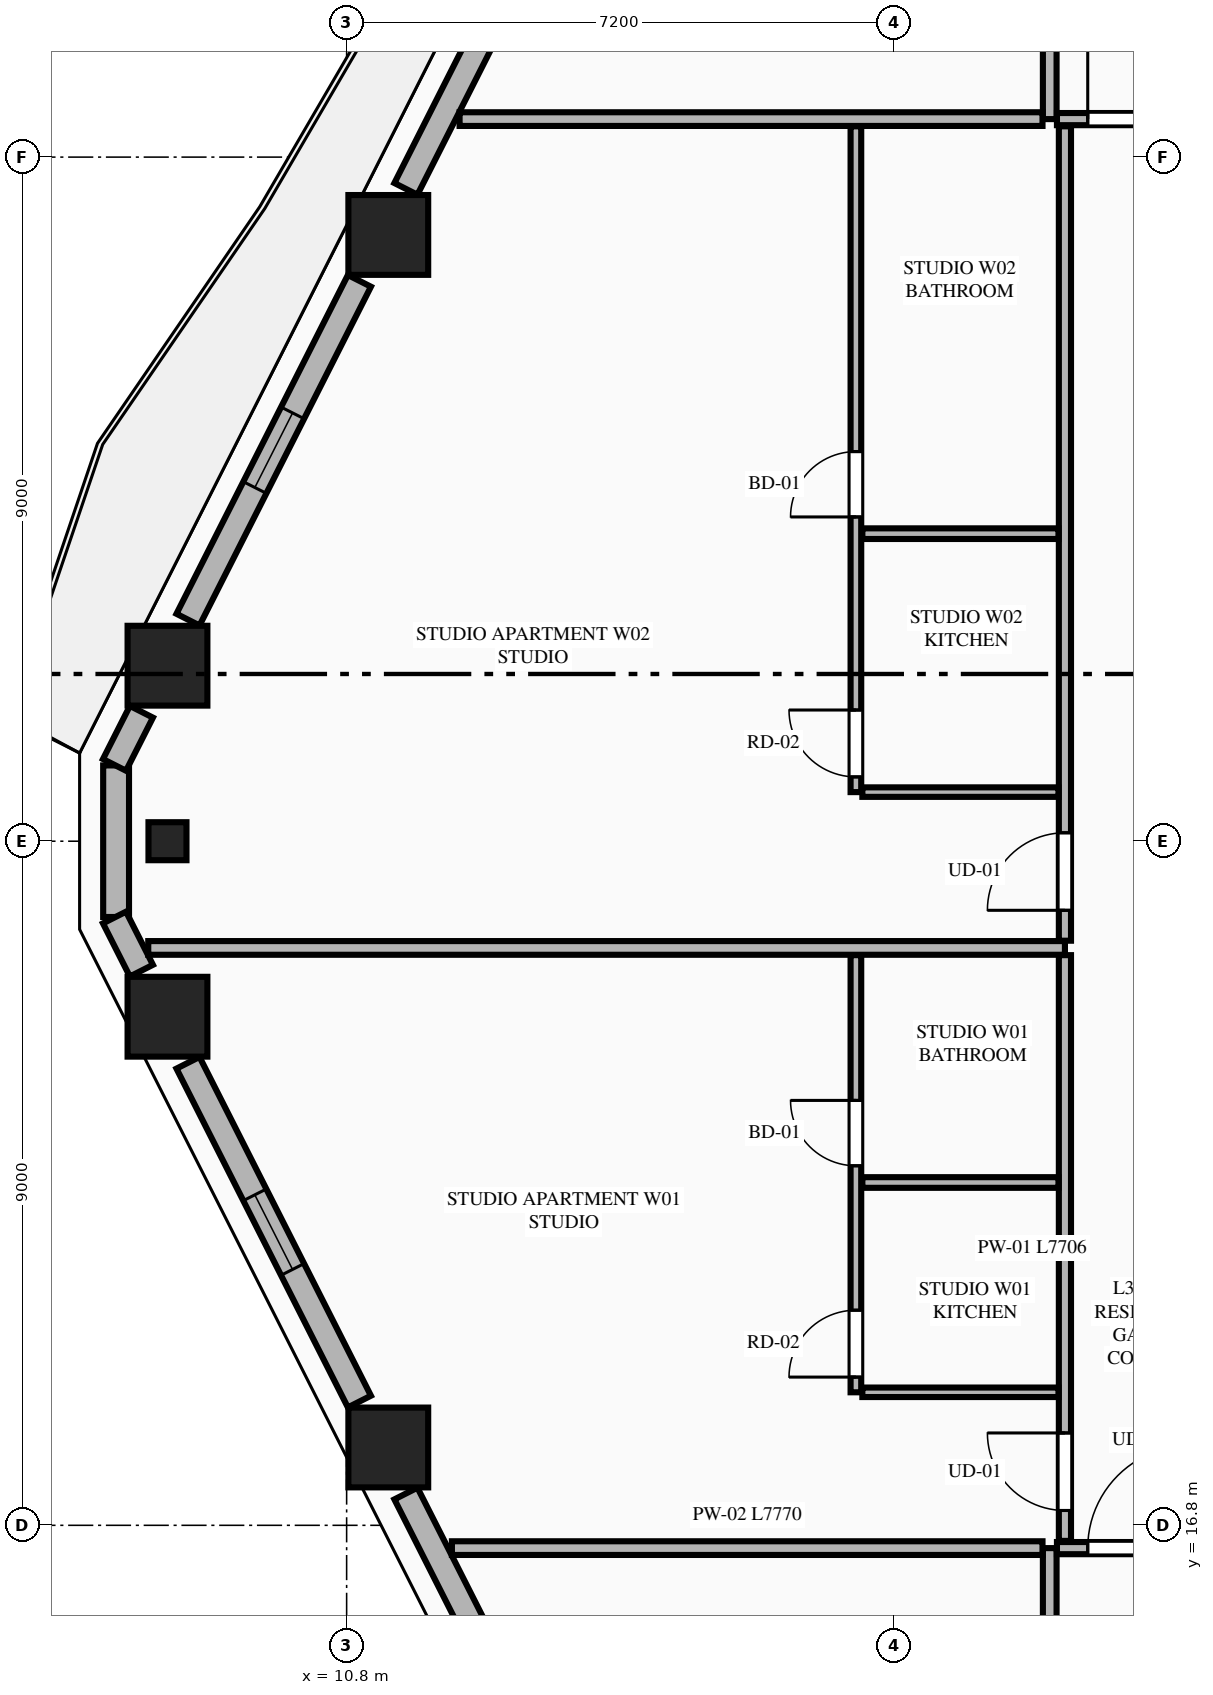
"""IFC4 building model, lengths in metres.
Left out: names, types, materials, properties, quantities, classifications, styles, units other than length and angle.
Written with IfcOpenShell. Run it as: python <this file> out.ifc"""

import sys

from ifc_helpers import new_model, si_unit, direction, frame, frame_2d, origin, origin_2d, place, context, subcontext, project, spatial, rectangle, extrude, element, fill, save


model = new_model("IFC4")
c1 = context("Model", 3, precision=1e-05, world=origin(), true_north=direction((0.0, 1.0)))
c2 = subcontext(c1, "Body", "Model", "MODEL_VIEW")
j1 = project(units=[si_unit("LENGTHUNIT", "METRE"), si_unit("PLANEANGLEUNIT", "RADIAN")], contexts=[c1])
p1 = place(None, origin())
s1 = spatial("IfcSite", under=j1, at=p1, CompositionType="ELEMENT")
p2 = place(p1, origin())
s2 = spatial("IfcBuilding", under=s1, at=p2, CompositionType="ELEMENT")
p3 = place(p2, frame((0.0, 0.0, 141.0)))
s3 = spatial("IfcBuildingStorey", under=s2, at=p3, CompositionType="ELEMENT", Elevation=141.0)
for number, where, z_axis, x_axis in (
    (1, (11.348, 33.776, 0.0), (0.0, 0.0, 1.0), (1.0, 0.0, 0.0)),
    (2, (8.443, 28.109, 0.0), (0.0, 0.0, 1.0), (1.0, 0.0, 0.0)),
    (3, (8.443, 23.491, 0.0), (0.0, 0.0, 1.0), (1.0, 0.0, 0.0)),
    (4, (11.348, 17.824, 0.0), (0.0, 0.0, 1.0), (1.0, 0.0, 0.0)),
):
    element("IfcColumn", number, at=place(p3, frame(where, z_axis=z_axis, x_axis=x_axis)), inside=s3, PredefinedType="COLUMN", context=c2, shape_type="SweptSolid", body=[
        extrude(rectangle(XDim=1.05, YDim=1.05, at=origin_2d()), origin(), (0.0, 0.0, 1.0), 3.55),
    ])
p4 = place(p3, frame((8.443, 25.8, 0.0), z_axis=(0.0, 0.0, 1.0), x_axis=(0.0, -1.0, 0.0)))
e5 = element("IfcColumn", 5, at=p4, inside=s3, PredefinedType="PILASTER", context=c2, shape_type="SweptSolid", body=[
    extrude(rectangle(XDim=0.5, YDim=0.35, at=origin_2d()), origin(), (0.0, 0.0, 1.0), 3.55),
])
p5 = place(p3, frame((7.767, 26.797, 0.0), z_axis=(0.0, 0.0, 1.0), x_axis=(0.0, -1.0, 0.0)))
e6 = element("IfcWall", 6, at=p5, inside=s3, PredefinedType="STANDARD", context=c2, shape_type="SweptSolid", body=[
    extrude(rectangle(XDim=1.994, YDim=0.34, at=frame_2d((0.997, 0.0))), origin(), (0.0, 0.0, 1.0), 3.34),
])
p6 = place(p3, frame((13.937, 39.039, 0.0), z_axis=(0.0, 0.0, 1.0), x_axis=(-0.451567731634, -0.892236842855, 0.0)))
e7 = element("IfcWall", 7, at=p6, inside=s3, PredefinedType="STANDARD", context=c2, shape_type="SweptSolid", body=[
    extrude(rectangle(XDim=5.219, YDim=0.34, at=frame_2d((2.61, 0.0))), origin(), (0.0, 0.0, 1.0), 2.797),
])
p7 = place(p6, frame((1.42, 0.0, 0.0)))
e8 = element("IfcOpeningElement", 8, at=p7, cuts=e7, PredefinedType="OPENING", context=c2, shape_type="SweptSolid", body=[
    extrude(rectangle(XDim=1.1, YDim=2.25, at=frame_2d((0.55, 1.125))), frame((0.0, 0.18, 0.0), z_axis=(0.0, -1.0, 0.0), x_axis=(1.0, 0.0, 0.0)), (0.0, 0.0, 1.0), 0.36),
])
p8 = place(p3, frame((10.968, 33.172, 0.0), z_axis=(0.0, 0.0, 1.0), x_axis=(-0.451470533039, -0.892286029139, 0.0)))
e9 = element("IfcWall", 9, at=p8, inside=s3, PredefinedType="STANDARD", context=c2, shape_type="SweptSolid", body=[
    extrude(rectangle(XDim=4.995, YDim=0.34, at=frame_2d((2.498, 0.0))), origin(), (0.0, 0.0, 1.0), 2.797),
])
p9 = place(p8, frame((1.947, 0.0, 0.75)))
e10 = element("IfcOpeningElement", 10, at=p9, cuts=e9, PredefinedType="OPENING", context=c2, shape_type="SweptSolid", body=[
    extrude(rectangle(XDim=1.1, YDim=1.897, at=frame_2d((0.55, 0.948))), frame((0.0, 0.18, 0.0), z_axis=(0.0, -1.0, 0.0), x_axis=(1.0, 0.0, 0.0)), (0.0, 0.0, 1.0), 0.36),
])
for number, where, z_axis, x_axis in (
    (11, (8.1, 27.503, 0.0), (0.0, 0.0, 1.0), (-0.452, -0.892, 0.0)),
    (12, (7.746, 24.796, 0.0), (0.0, 0.0, 1.0), (0.452, -0.892, 0.0)),
):
    element("IfcWall", number, at=place(p3, frame(where, z_axis=z_axis, x_axis=x_axis)), inside=s3, PredefinedType="STANDARD", context=c2, shape_type="SweptSolid", body=[
        extrude(rectangle(XDim=0.783, YDim=0.34, at=frame_2d((0.392, 0.0))), origin(), (0.0, 0.0, 1.0), 3.34),
    ])
p10 = place(p3, frame((8.713, 22.885, 0.0), z_axis=(0.0, 0.0, 1.0), x_axis=(0.451470533039, -0.892286029139, 0.0)))
e13 = element("IfcWall", 13, at=p10, inside=s3, PredefinedType="STANDARD", context=c2, shape_type="SweptSolid", body=[
    extrude(rectangle(XDim=4.995, YDim=0.34, at=frame_2d((2.498, 0.0))), origin(), (0.0, 0.0, 1.0), 2.797),
])
p11 = place(p10, frame((1.947, 0.0, 0.75)))
e14 = element("IfcOpeningElement", 14, at=p11, cuts=e13, PredefinedType="OPENING", context=c2, shape_type="SweptSolid", body=[
    extrude(rectangle(XDim=1.1, YDim=1.897, at=frame_2d((0.55, 0.948))), frame((0.0, 0.18, 0.0), z_axis=(0.0, -1.0, 0.0), x_axis=(1.0, 0.0, 0.0)), (0.0, 0.0, 1.0), 0.36),
])
p12 = place(p3, frame((11.58, 17.218, 0.0), z_axis=(0.0, 0.0, 1.0), x_axis=(0.451567731634, -0.892236842855, 0.0)))
e15 = element("IfcWall", 15, at=p12, inside=s3, PredefinedType="STANDARD", context=c2, shape_type="SweptSolid", body=[
    extrude(rectangle(XDim=5.219, YDim=0.34, at=frame_2d((2.61, 0.0))), origin(), (0.0, 0.0, 1.0), 2.797),
])
p13 = place(p12, frame((2.06, 0.0, 0.75)))
e16 = element("IfcOpeningElement", 16, at=p13, cuts=e15, PredefinedType="OPENING", context=c2, shape_type="SweptSolid", body=[
    extrude(rectangle(XDim=1.1, YDim=1.897, at=frame_2d((0.55, 0.948))), frame((0.0, 0.18, 0.0), z_axis=(0.0, -1.0, 0.0), x_axis=(1.0, 0.0, 0.0)), (0.0, 0.0, 1.0), 0.36),
])
p14 = place(p3, frame((20.05, 4.105, 0.0), z_axis=(0.0, 0.0, 1.0), x_axis=(0.0, 1.0, 0.0)))
e17 = element("IfcWall", 17, at=p14, inside=s3, PredefinedType="PARTITIONING", context=c2, shape_type="SweptSolid", body=[
    extrude(rectangle(XDim=12.395, YDim=0.18, at=frame_2d((6.198, 0.0))), origin(), (0.0, 0.0, 1.0), 3.34),
])
p15 = place(p3, frame((20.145, 16.5, 0.0), z_axis=(0.0, 0.0, 1.0), x_axis=(1.0, 0.0, 0.0)))
e18 = element("IfcWall", 18, at=p15, inside=s3, PredefinedType="PARTITIONING", context=c2, shape_type="SweptSolid", body=[
    extrude(rectangle(XDim=24.51, YDim=0.16, at=frame_2d((12.255, 0.0))), origin(), (0.0, 0.0, 1.0), 3.34),
])
p16 = place(p15, frame((0.405, 0.0, 0.0)))
e19 = element("IfcOpeningElement", 19, at=p16, cuts=e18, PredefinedType="OPENING", context=c2, shape_type="SweptSolid", body=[
    extrude(rectangle(XDim=1.35, YDim=2.35, at=frame_2d((0.675, 1.175))), frame((0.0, 0.09, 0.0), z_axis=(0.0, -1.0, 0.0), x_axis=(1.0, 0.0, 0.0)), (0.0, 0.0, 1.0), 0.18),
])
p17 = place(p3, frame((20.05, 35.3, 0.0), z_axis=(0.0, 0.0, 1.0), x_axis=(0.0, 1.0, 0.0)))
e20 = element("IfcWall", 20, at=p17, inside=s3, PredefinedType="PARTITIONING", context=c2, shape_type="SweptSolid", body=[
    extrude(rectangle(XDim=12.195, YDim=0.18, at=frame_2d((6.098, 0.0))), origin(), (0.0, 0.0, 1.0), 3.34),
])
p18 = place(p3, frame((20.145, 35.3, 0.0), z_axis=(0.0, 0.0, 1.0), x_axis=(1.0, 0.0, 0.0)))
e21 = element("IfcWall", 21, at=p18, inside=s3, PredefinedType="PARTITIONING", context=c2, shape_type="SweptSolid", body=[
    extrude(rectangle(XDim=24.51, YDim=0.16, at=frame_2d((12.255, 0.0))), origin(), (0.0, 0.0, 1.0), 3.34),
])
p19 = place(p18, frame((0.405, 0.0, 0.0)))
e22 = element("IfcOpeningElement", 22, at=p19, cuts=e21, PredefinedType="OPENING", context=c2, shape_type="SweptSolid", body=[
    extrude(rectangle(XDim=1.35, YDim=2.35, at=frame_2d((0.675, 1.175))), frame((0.0, 0.09, 0.0), z_axis=(0.0, -1.0, 0.0), x_axis=(1.0, 0.0, 0.0)), (0.0, 0.0, 1.0), 0.18),
])
p20 = place(p3, frame((12.185, 16.5, 0.0), z_axis=(0.0, 0.0, 1.0), x_axis=(1.0, 0.0, 0.0)))
e23 = element("IfcWall", 23, at=p20, inside=s3, PredefinedType="PARTITIONING", context=c2, shape_type="SweptSolid", body=[
    extrude(rectangle(XDim=7.77, YDim=0.18, at=frame_2d((3.885, 0.0))), origin(), (0.0, 0.0, 1.0), 3.34),
])
p21 = place(p3, frame((12.286, 35.3, 0.0), z_axis=(0.0, 0.0, 1.0), x_axis=(1.0, 0.0, 0.0)))
e24 = element("IfcWall", 24, at=p21, inside=s3, PredefinedType="PARTITIONING", context=c2, shape_type="SweptSolid", body=[
    extrude(rectangle(XDim=7.669, YDim=0.18, at=frame_2d((3.834, 0.0))), origin(), (0.0, 0.0, 1.0), 3.34),
])
p22 = place(p3, frame((20.25, 16.595, 0.0), z_axis=(0.0, 0.0, 1.0), x_axis=(0.0, 1.0, 0.0)))
e25 = element("IfcWall", 25, at=p22, inside=s3, PredefinedType="PARTITIONING", context=c2, shape_type="SweptSolid", body=[
    extrude(rectangle(XDim=7.706, YDim=0.16, at=frame_2d((3.853, 0.0))), origin(), (0.0, 0.0, 1.0), 3.34),
])
p23 = place(p22, frame((0.4, 0.0, 0.0)))
e26 = element("IfcOpeningElement", 26, at=p23, cuts=e25, PredefinedType="OPENING", context=c2, shape_type="SweptSolid", body=[
    extrude(rectangle(XDim=1.02, YDim=2.25, at=frame_2d((0.51, 1.125))), frame((0.0, 0.09, 0.0), z_axis=(0.0, -1.0, 0.0), x_axis=(1.0, 0.0, 0.0)), (0.0, 0.0, 1.0), 0.18),
])
p24 = place(p3, frame((17.585, 18.55, 0.0), z_axis=(0.0, 0.0, 1.0), x_axis=(1.0, 0.0, 0.0)))
e27 = element("IfcWall", 27, at=p24, inside=s3, PredefinedType="PARTITIONING", context=c2, shape_type="SweptSolid", body=[
    extrude(rectangle(XDim=2.58, YDim=0.125, at=frame_2d((1.29, 0.0))), origin(), (0.0, 0.0, 1.0), 2.722),
])
p25 = place(p3, frame((17.5, 18.55, 0.0), z_axis=(0.0, 0.0, 1.0), x_axis=(0.0, 1.0, 0.0)))
e28 = element("IfcWall", 28, at=p25, inside=s3, PredefinedType="PLUMBINGWALL", context=c2, shape_type="SweptSolid", body=[
    extrude(rectangle(XDim=5.751, YDim=0.14, at=frame_2d((2.875, 0.0))), origin(), (0.0, 0.0, 1.0), 3.34),
])
p26 = place(p25, frame((2.98, 0.0, 0.0)))
e29 = element("IfcOpeningElement", 29, at=p26, cuts=e28, PredefinedType="OPENING", context=c2, shape_type="SweptSolid", body=[
    extrude(rectangle(XDim=0.86, YDim=2.1, at=frame_2d((0.43, 1.05))), frame((0.0, 0.08, 0.0), z_axis=(0.0, -1.0, 0.0), x_axis=(1.0, 0.0, 0.0)), (0.0, 0.0, 1.0), 0.16),
])
p27 = place(p25, frame((0.2, 0.0, 0.0)))
e30 = element("IfcOpeningElement", 30, at=p27, cuts=e28, PredefinedType="OPENING", context=c2, shape_type="SweptSolid", body=[
    extrude(rectangle(XDim=0.88, YDim=2.15, at=frame_2d((0.44, 1.075))), frame((0.0, 0.08, 0.0), z_axis=(0.0, -1.0, 0.0), x_axis=(1.0, 0.0, 0.0)), (0.0, 0.0, 1.0), 0.16),
])
p28 = place(p3, frame((17.585, 21.31, 0.0), z_axis=(0.0, 0.0, 1.0), x_axis=(1.0, 0.0, 0.0)))
e31 = element("IfcWall", 31, at=p28, inside=s3, PredefinedType="PLUMBINGWALL", context=c2, shape_type="SweptSolid", body=[
    extrude(rectangle(XDim=2.58, YDim=0.14, at=frame_2d((1.29, 0.0))), origin(), (0.0, 0.0, 1.0), 3.34),
])
p29 = place(p3, frame((8.19, 24.396, 0.0), z_axis=(0.0, 0.0, 1.0), x_axis=(1.0, 0.0, 0.0)))
e32 = element("IfcWall", 32, at=p29, inside=s3, PredefinedType="PARTITIONING", context=c2, shape_type="SweptSolid", body=[
    extrude(rectangle(XDim=12.06, YDim=0.18, at=frame_2d((6.03, 0.0))), origin(), (0.0, 0.0, 1.0), 3.34),
])
p30 = place(p3, frame((20.25, 24.491, 0.0), z_axis=(0.0, 0.0, 1.0), x_axis=(0.0, 1.0, 0.0)))
e33 = element("IfcWall", 33, at=p30, inside=s3, PredefinedType="PARTITIONING", context=c2, shape_type="SweptSolid", body=[
    extrude(rectangle(XDim=10.714, YDim=0.16, at=frame_2d((5.357, 0.0))), origin(), (0.0, 0.0, 1.0), 3.34),
])
p31 = place(p30, frame((0.4, 0.0, 0.0)))
e34 = element("IfcOpeningElement", 34, at=p31, cuts=e33, PredefinedType="OPENING", context=c2, shape_type="SweptSolid", body=[
    extrude(rectangle(XDim=1.02, YDim=2.25, at=frame_2d((0.51, 1.125))), frame((0.0, 0.09, 0.0), z_axis=(0.0, -1.0, 0.0), x_axis=(1.0, 0.0, 0.0)), (0.0, 0.0, 1.0), 0.18),
])
p32 = place(p3, frame((17.585, 26.446, 0.0), z_axis=(0.0, 0.0, 1.0), x_axis=(1.0, 0.0, 0.0)))
e35 = element("IfcWall", 35, at=p32, inside=s3, PredefinedType="PARTITIONING", context=c2, shape_type="SweptSolid", body=[
    extrude(rectangle(XDim=2.58, YDim=0.125, at=frame_2d((1.29, 0.0))), origin(), (0.0, 0.0, 1.0), 3.34),
])
p33 = place(p3, frame((17.5, 26.446, 0.0), z_axis=(0.0, 0.0, 1.0), x_axis=(0.0, 1.0, 0.0)))
e36 = element("IfcWall", 36, at=p33, inside=s3, PredefinedType="PLUMBINGWALL", context=c2, shape_type="SweptSolid", body=[
    extrude(rectangle(XDim=8.759, YDim=0.14, at=frame_2d((4.379, 0.0))), origin(), (0.0, 0.0, 1.0), 3.34),
])
p34 = place(p33, frame((3.62, 0.0, 0.0)))
e37 = element("IfcOpeningElement", 37, at=p34, cuts=e36, PredefinedType="OPENING", context=c2, shape_type="SweptSolid", body=[
    extrude(rectangle(XDim=0.86, YDim=2.1, at=frame_2d((0.43, 1.05))), frame((0.0, 0.08, 0.0), z_axis=(0.0, -1.0, 0.0), x_axis=(1.0, 0.0, 0.0)), (0.0, 0.0, 1.0), 0.16),
])
p35 = place(p33, frame((0.2, 0.0, 0.0)))
e38 = element("IfcOpeningElement", 38, at=p35, cuts=e36, PredefinedType="OPENING", context=c2, shape_type="SweptSolid", body=[
    extrude(rectangle(XDim=0.88, YDim=2.15, at=frame_2d((0.44, 1.075))), frame((0.0, 0.08, 0.0), z_axis=(0.0, -1.0, 0.0), x_axis=(1.0, 0.0, 0.0)), (0.0, 0.0, 1.0), 0.16),
])
p36 = place(p3, frame((17.585, 29.846, 0.0), z_axis=(0.0, 0.0, 1.0), x_axis=(1.0, 0.0, 0.0)))
e39 = element("IfcWall", 39, at=p36, inside=s3, PredefinedType="PLUMBINGWALL", context=c2, shape_type="SweptSolid", body=[
    extrude(rectangle(XDim=2.58, YDim=0.14, at=frame_2d((1.29, 0.0))), origin(), (0.0, 0.0, 1.0), 3.34),
])
p37 = place(p9, origin())
e40 = element("IfcWindow", 40, at=p37, inside=s3, PartitioningType="SINGLE_PANEL", PredefinedType="WINDOW", context=c2, shape_type="SweptSolid", body=[
    extrude(rectangle(XDim=1.1, YDim=1.897, at=frame_2d((0.55, 0.948))), frame((0.0, 0.03, 0.0), z_axis=(0.0, -1.0, 0.0), x_axis=(1.0, 0.0, 0.0)), (0.0, 0.0, 1.0), 0.06),
])
fill(e10, e40)
p38 = place(p11, origin())
e41 = element("IfcWindow", 41, at=p38, inside=s3, PartitioningType="SINGLE_PANEL", PredefinedType="WINDOW", context=c2, shape_type="SweptSolid", body=[
    extrude(rectangle(XDim=1.1, YDim=1.897, at=frame_2d((0.55, 0.948))), frame((0.0, 0.03, 0.0), z_axis=(0.0, -1.0, 0.0), x_axis=(1.0, 0.0, 0.0)), (0.0, 0.0, 1.0), 0.06),
])
fill(e14, e41)
p39 = place(p16, origin())
e42 = element("IfcDoor", 42, at=p39, inside=s3, OperationType="SINGLE_SWING_RIGHT", PredefinedType="DOOR", context=c2, shape_type="SweptSolid", body=[
    extrude(rectangle(XDim=1.35, YDim=2.35, at=frame_2d((0.675, 1.175))), frame((0.0, 0.025, 0.0), z_axis=(0.0, -1.0, 0.0), x_axis=(1.0, 0.0, 0.0)), (0.0, 0.0, 1.0), 0.05),
])
fill(e19, e42)
p40 = place(p19, origin())
e43 = element("IfcDoor", 43, at=p40, inside=s3, OperationType="SINGLE_SWING_LEFT", PredefinedType="DOOR", context=c2, shape_type="SweptSolid", body=[
    extrude(rectangle(XDim=1.35, YDim=2.35, at=frame_2d((0.675, 1.175))), frame((0.0, 0.025, 0.0), z_axis=(0.0, -1.0, 0.0), x_axis=(1.0, 0.0, 0.0)), (0.0, 0.0, 1.0), 0.05),
])
fill(e22, e43)
p41 = place(p26, origin())
e44 = element("IfcDoor", 44, at=p41, inside=s3, OperationType="SINGLE_SWING_RIGHT", PredefinedType="DOOR", context=c2, shape_type="SweptSolid", body=[
    extrude(rectangle(XDim=0.86, YDim=2.1, at=frame_2d((0.43, 1.05))), frame((0.0, 0.025, 0.0), z_axis=(0.0, -1.0, 0.0), x_axis=(1.0, 0.0, 0.0)), (0.0, 0.0, 1.0), 0.05),
])
fill(e29, e44)
p42 = place(p23, origin())
e45 = element("IfcDoor", 45, at=p42, inside=s3, OperationType="SINGLE_SWING_RIGHT", PredefinedType="DOOR", context=c2, shape_type="SweptSolid", body=[
    extrude(rectangle(XDim=1.02, YDim=2.25, at=frame_2d((0.51, 1.125))), frame((0.0, 0.025, 0.0), z_axis=(0.0, -1.0, 0.0), x_axis=(1.0, 0.0, 0.0)), (0.0, 0.0, 1.0), 0.05),
])
fill(e26, e45)
p43 = place(p27, origin())
e46 = element("IfcDoor", 46, at=p43, inside=s3, OperationType="SINGLE_SWING_LEFT", PredefinedType="DOOR", context=c2, shape_type="SweptSolid", body=[
    extrude(rectangle(XDim=0.88, YDim=2.15, at=frame_2d((0.44, 1.075))), frame((0.0, 0.025, 0.0), z_axis=(0.0, -1.0, 0.0), x_axis=(1.0, 0.0, 0.0)), (0.0, 0.0, 1.0), 0.05),
])
fill(e30, e46)
p44 = place(p34, origin())
e47 = element("IfcDoor", 47, at=p44, inside=s3, OperationType="SINGLE_SWING_LEFT", PredefinedType="DOOR", context=c2, shape_type="SweptSolid", body=[
    extrude(rectangle(XDim=0.86, YDim=2.1, at=frame_2d((0.43, 1.05))), frame((0.0, 0.025, 0.0), z_axis=(0.0, -1.0, 0.0), x_axis=(1.0, 0.0, 0.0)), (0.0, 0.0, 1.0), 0.05),
])
fill(e37, e47)
p45 = place(p31, origin())
e48 = element("IfcDoor", 48, at=p45, inside=s3, OperationType="SINGLE_SWING_LEFT", PredefinedType="DOOR", context=c2, shape_type="SweptSolid", body=[
    extrude(rectangle(XDim=1.02, YDim=2.25, at=frame_2d((0.51, 1.125))), frame((0.0, 0.025, 0.0), z_axis=(0.0, -1.0, 0.0), x_axis=(1.0, 0.0, 0.0)), (0.0, 0.0, 1.0), 0.05),
])
fill(e34, e48)
p46 = place(p35, origin())
e49 = element("IfcDoor", 49, at=p46, inside=s3, OperationType="SINGLE_SWING_RIGHT", PredefinedType="DOOR", context=c2, shape_type="SweptSolid", body=[
    extrude(rectangle(XDim=0.88, YDim=2.15, at=frame_2d((0.44, 1.075))), frame((0.0, 0.025, 0.0), z_axis=(0.0, -1.0, 0.0), x_axis=(1.0, 0.0, 0.0)), (0.0, 0.0, 1.0), 0.05),
])
fill(e38, e49)
save(model, sys.argv[1])
